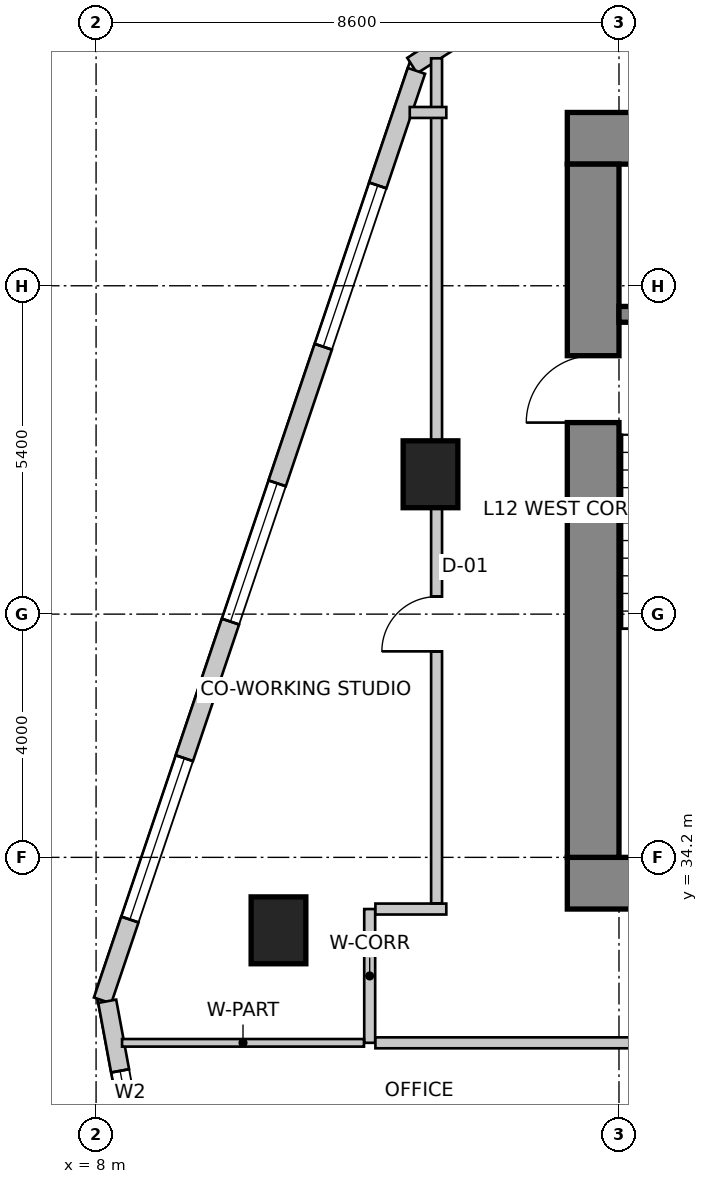
"""IFC4 building model, lengths in metres.
Left out: names, types, materials, properties, quantities, classifications, styles, units other than length and angle.
Written with IfcOpenShell. Run it as: python <this file> out.ifc"""

import sys

from ifc_helpers import new_model, si_unit, direction, frame, frame_2d, origin, origin_2d, place, context, subcontext, project, spatial, rectangle, extrude, source, transform, mapped, element, fill, save


model = new_model("IFC4")
c1 = context("Model", 3, precision=1e-05, world=origin(), true_north=direction((0.0, 1.0)))
c2 = subcontext(c1, "Body", "Model", "MODEL_VIEW")
j1 = project(units=[si_unit("LENGTHUNIT", "METRE"), si_unit("PLANEANGLEUNIT", "RADIAN")], contexts=[c1])
p1 = place(None, origin())
s1 = spatial("IfcSite", under=j1, at=p1, CompositionType="ELEMENT")
p2 = place(p1, origin())
s2 = spatial("IfcBuilding", under=s1, at=p2, CompositionType="ELEMENT")
p3 = place(p2, frame((0.0, 0.0, 51.0)))
s3 = spatial("IfcBuildingStorey", under=s2, at=p3, CompositionType="ELEMENT", Elevation=51.0)
p4 = place(p3, frame((15.75, 46.025, 0.0), z_axis=(0.0, 0.0, 1.0), x_axis=(1.0, 0.0, 0.0)))
e1 = element("IfcWall", 1, at=p4, inside=s3, PredefinedType="SHEAR", context=c2, shape_type="SweptSolid", body=[
    extrude(rectangle(XDim=16.1, YDim=0.85, at=frame_2d((8.05, 0.0))), origin(), (0.0, 0.0, 1.0), 4.0),
])
p5 = place(p3, frame((15.75, 33.775, 0.0), z_axis=(0.0, 0.0, 1.0), x_axis=(1.0, 0.0, 0.0)))
e2 = element("IfcWall", 2, at=p5, inside=s3, PredefinedType="SHEAR", context=c2, shape_type="SweptSolid", body=[
    extrude(rectangle(XDim=16.1, YDim=0.85, at=frame_2d((8.05, 0.0))), origin(), (0.0, 0.0, 1.0), 4.0),
])
m1 = source(origin(), c2, "Body", "SweptSolid", [
    extrude(rectangle(XDim=1.3, YDim=2.15, at=frame_2d((0.65, 1.075))), frame((0.0, 0.435, 0.0), z_axis=(0.0, -1.0, 0.0), x_axis=(1.0, 0.0, 0.0)), (0.0, 0.0, 1.0), 0.87),
])
p6 = place(p5, frame((10.18, 0.0, 0.0)))
e3 = element("IfcOpeningElement", 3, at=p6, cuts=e2, PredefinedType="OPENING", context=c2, shape_type="MappedRepresentation", body=[
    mapped(m1, transform((0.0, 0.0, 0.0), scale=1.0)),
])
p7 = place(p3, frame((16.175, 34.2, 0.0), z_axis=(0.0, 0.0, 1.0), x_axis=(0.0, 1.0, 0.0)))
e4 = element("IfcWall", 4, at=p7, inside=s3, PredefinedType="SHEAR", context=c2, shape_type="SweptSolid", body=[
    extrude(rectangle(XDim=11.4, YDim=0.85, at=frame_2d((5.7, 0.0))), origin(), (0.0, 0.0, 1.0), 4.0),
])
m2 = source(origin(), c2, "Body", "SweptSolid", [
    extrude(rectangle(XDim=1.1, YDim=2.15, at=frame_2d((0.55, 1.075))), frame((0.0, 0.435, 0.0), z_axis=(0.0, -1.0, 0.0), x_axis=(1.0, 0.0, 0.0)), (0.0, 0.0, 1.0), 0.87),
])
p8 = place(p7, frame((7.15, 0.0, 0.0)))
e5 = element("IfcOpeningElement", 5, at=p8, cuts=e4, PredefinedType="OPENING", context=c2, shape_type="MappedRepresentation", body=[
    mapped(m2, transform((0.0, 0.0, 0.0), scale=1.0)),
])
p9 = place(p3, frame((16.6, 43.13, 0.0), z_axis=(0.0, 0.0, 1.0), x_axis=(1.0, 0.0, 0.0)))
e6 = element("IfcWall", 6, at=p9, inside=s3, PredefinedType="SHEAR", context=c2, shape_type="SweptSolid", body=[
    extrude(rectangle(XDim=3.5, YDim=0.26, at=frame_2d((1.75, 0.0))), origin(), (0.0, 0.0, 1.0), 4.0),
])
m3 = source(origin(), c2, "Body", "SweptSolid", [
    extrude(rectangle(XDim=0.9, YDim=1.1, at=origin_2d()), origin(), (0.0, 0.0, 1.0), 4.0),
])
for number, where, z_axis, x_axis in (
    (7, (11.0, 33.0, 0.0), (0.0, 0.0, 1.0), (1.0, 0.0, 0.0)),
    (8, (13.5, 40.5, 0.0), (0.0, 0.0, 1.0), (1.0, 0.0, 0.0)),
):
    element("IfcColumn", number, at=place(p3, frame(where, z_axis=z_axis, x_axis=x_axis)), inside=s3, PredefinedType="COLUMN", context=c2, shape_type="MappedRepresentation", body=[
        mapped(m3, transform((0.0, 0.0, 0.0), scale=1.0)),
    ])
p10 = place(p3, frame((21.875, 52.743, 0.0), z_axis=(0.0, 0.0, 1.0), x_axis=(-0.843647802826, -0.536896996441, 0.0)))
e9 = element("IfcWall", 9, at=p10, inside=s3, PredefinedType="SOLIDWALL", context=c2, shape_type="SweptSolid", body=[
    extrude(rectangle(XDim=10.284, YDim=0.3, at=frame_2d((5.142, 0.0))), origin(), (0.0, 0.0, 1.0), 3.75),
])
m4 = source(origin(), c2, "Body", "SweptSolid", [
    extrude(rectangle(XDim=0.9, YDim=1.6, at=frame_2d((0.45, 0.8))), frame((0.0, 0.16, 0.0), z_axis=(0.0, -1.0, 0.0), x_axis=(1.0, 0.0, 0.0)), (0.0, 0.0, 1.0), 0.32),
])
p11 = place(p10, frame((0.629, 0.0, 0.85)))
e10 = element("IfcOpeningElement", 10, at=p11, cuts=e9, PredefinedType="OPENING", context=c2, shape_type="MappedRepresentation", body=[
    mapped(m4, transform((0.0, 0.0, 0.0), scale=1.0)),
])
m5 = source(origin(), c2, "Body", "SweptSolid", [
    extrude(rectangle(XDim=2.4, YDim=2.2, at=frame_2d((1.2, 1.1))), frame((0.0, 0.16, 0.0), z_axis=(0.0, -1.0, 0.0), x_axis=(1.0, 0.0, 0.0)), (0.0, 0.0, 1.0), 0.32),
])
p12 = place(p10, frame((3.542, 0.0, 0.85)))
e11 = element("IfcOpeningElement", 11, at=p12, cuts=e9, PredefinedType="OPENING", context=c2, shape_type="MappedRepresentation", body=[
    mapped(m5, transform((0.0, 0.0, 0.0), scale=1.0)),
])
m6 = source(origin(), c2, "Body", "SweptSolid", [
    extrude(rectangle(XDim=1.5, YDim=1.8, at=frame_2d((0.75, 0.9))), frame((0.0, 0.16, 0.0), z_axis=(0.0, -1.0, 0.0), x_axis=(1.0, 0.0, 0.0)), (0.0, 0.0, 1.0), 0.32),
])
p13 = place(p10, frame((7.904, 0.0, 0.85)))
e12 = element("IfcOpeningElement", 12, at=p13, cuts=e9, PredefinedType="OPENING", context=c2, shape_type="MappedRepresentation", body=[
    mapped(m6, transform((0.0, 0.0, 0.0), scale=1.0)),
])
p14 = place(p3, frame((13.269, 47.134, 0.0), z_axis=(0.0, 0.0, 1.0), x_axis=(-0.319920423265, -0.947444416722, 0.0)))
e13 = element("IfcWall", 13, at=p14, inside=s3, PredefinedType="SOLIDWALL", context=c2, shape_type="SweptSolid", body=[
    extrude(rectangle(XDim=16.135, YDim=0.3, at=frame_2d((8.067, 0.0))), origin(), (0.0, 0.0, 1.0), 3.75),
])
m7 = source(origin(), c2, "Body", "SweptSolid", [
    extrude(rectangle(XDim=2.8, YDim=2.4, at=frame_2d((1.4, 1.2))), frame((0.0, 0.16, 0.0), z_axis=(0.0, -1.0, 0.0), x_axis=(1.0, 0.0, 0.0)), (0.0, 0.0, 1.0), 0.32),
])
p15 = place(p14, frame((1.988, 0.0, 0.85)))
e14 = element("IfcOpeningElement", 14, at=p15, cuts=e13, PredefinedType="OPENING", context=c2, shape_type="MappedRepresentation", body=[
    mapped(m7, transform((0.0, 0.0, 0.0), scale=1.0)),
])
p16 = place(p14, frame((7.159, 0.0, 0.85)))
e15 = element("IfcOpeningElement", 15, at=p16, cuts=e13, PredefinedType="OPENING", context=c2, shape_type="MappedRepresentation", body=[
    mapped(m5, transform((0.0, 0.0, 0.0), scale=1.0)),
])
p17 = place(p14, frame((11.93, 0.0, 0.85)))
e16 = element("IfcOpeningElement", 16, at=p17, cuts=e13, PredefinedType="OPENING", context=c2, shape_type="MappedRepresentation", body=[
    mapped(m7, transform((0.0, 0.0, 0.0), scale=1.0)),
])
p18 = place(p3, frame((8.183, 31.833, 0.0), z_axis=(0.0, 0.0, 1.0), x_axis=(0.18216364648, -0.983268226834, 0.0)))
e17 = element("IfcWall", 17, at=p18, inside=s3, PredefinedType="SOLIDWALL", context=c2, shape_type="SweptSolid", body=[
    extrude(rectangle(XDim=26.678, YDim=0.3, at=frame_2d((13.339, 0.0))), origin(), (0.0, 0.0, 1.0), 3.75),
])
m8 = source(origin(), c2, "Body", "SweptSolid", [
    extrude(rectangle(XDim=1.8, YDim=2.1, at=frame_2d((0.9, 1.05))), frame((0.0, 0.16, 0.0), z_axis=(0.0, -1.0, 0.0), x_axis=(1.0, 0.0, 0.0)), (0.0, 0.0, 1.0), 0.32),
])
p19 = place(p18, frame((1.164, 0.0, 0.85)))
e18 = element("IfcOpeningElement", 18, at=p19, cuts=e17, PredefinedType="OPENING", context=c2, shape_type="MappedRepresentation", body=[
    mapped(m8, transform((0.0, 0.0, 0.0), scale=1.0)),
])
p20 = place(p18, frame((4.5, 0.0, 0.85)))
e19 = element("IfcOpeningElement", 19, at=p20, cuts=e17, PredefinedType="OPENING", context=c2, shape_type="MappedRepresentation", body=[
    mapped(m5, transform((0.0, 0.0, 0.0), scale=1.0)),
])
p21 = place(p18, frame((9.076, 0.0, 0.85)))
e20 = element("IfcOpeningElement", 20, at=p21, cuts=e17, PredefinedType="OPENING", context=c2, shape_type="MappedRepresentation", body=[
    mapped(m5, transform((0.0, 0.0, 0.0), scale=1.0)),
])
p22 = place(p18, frame((13.653, 0.0, 0.85)))
e21 = element("IfcOpeningElement", 21, at=p22, cuts=e17, PredefinedType="OPENING", context=c2, shape_type="MappedRepresentation", body=[
    mapped(m5, transform((0.0, 0.0, 0.0), scale=1.0)),
])
p23 = place(p18, frame((18.411, 0.0, 0.85)))
e22 = element("IfcOpeningElement", 22, at=p23, cuts=e17, PredefinedType="OPENING", context=c2, shape_type="MappedRepresentation", body=[
    mapped(m5, transform((0.0, 0.0, 0.0), scale=1.0)),
])
p24 = place(p18, frame((22.709, 0.0, 0.85)))
e23 = element("IfcOpeningElement", 23, at=p24, cuts=e17, PredefinedType="OPENING", context=c2, shape_type="MappedRepresentation", body=[
    mapped(m7, transform((0.0, 0.0, 0.0), scale=1.0)),
])
p25 = place(p3, frame((12.5, 31.15, 0.0), z_axis=(0.0, 0.0, 1.0), x_axis=(0.0, 1.0, 0.0)))
e24 = element("IfcWall", 24, at=p25, inside=s3, PredefinedType="PARTITIONING", context=c2, shape_type="SweptSolid", body=[
    extrude(rectangle(XDim=2.2, YDim=0.18, at=frame_2d((1.1, 0.0))), origin(), (0.0, 0.0, 1.0), 3.335),
])
p26 = place(p3, frame((12.594, 33.35, 0.0), z_axis=(0.0, 0.0, 1.0), x_axis=(1.0, 0.0, 0.0)))
e25 = element("IfcWall", 25, at=p26, inside=s3, PredefinedType="PARTITIONING", context=c2, shape_type="SweptSolid", body=[
    extrude(rectangle(XDim=1.166, YDim=0.18, at=frame_2d((0.583, 0.0))), origin(), (0.0, 0.0, 1.0), 3.75),
])
p27 = place(p3, frame((17.96, 31.15, 0.0), z_axis=(0.0, 0.0, 1.0), x_axis=(-1.0, 0.0, 0.0)))
e26 = element("IfcWall", 26, at=p27, inside=s3, PredefinedType="PARTITIONING", context=c2, shape_type="SweptSolid", body=[
    extrude(rectangle(XDim=5.366, YDim=0.18, at=frame_2d((2.683, 0.0))), origin(), (0.0, 0.0, 1.0), 3.335),
])
p28 = place(p3, frame((13.6, 33.444, 0.0), z_axis=(0.0, 0.0, 1.0), x_axis=(0.0, 1.0, 0.0)))
e27 = element("IfcWall", 27, at=p28, inside=s3, PredefinedType="PARTITIONING", context=c2, shape_type="SweptSolid", body=[
    extrude(rectangle(XDim=13.896, YDim=0.18, at=frame_2d((6.948, 0.0))), origin(), (0.0, 0.0, 1.0), 2.892),
])
m9 = source(origin(), c2, "Body", "SweptSolid", [
    extrude(rectangle(XDim=0.9, YDim=2.15, at=frame_2d((0.45, 1.075))), frame((0.0, 0.1, 0.0), z_axis=(0.0, -1.0, 0.0), x_axis=(1.0, 0.0, 0.0)), (0.0, 0.0, 1.0), 0.2),
])
p29 = place(p28, frame((4.144, 0.0, 0.0)))
e28 = element("IfcOpeningElement", 28, at=p29, cuts=e27, PredefinedType="OPENING", context=c2, shape_type="MappedRepresentation", body=[
    mapped(m9, transform((0.0, 0.0, 0.0), scale=1.0)),
])
p30 = place(p3, frame((13.76, 46.45, 0.0), z_axis=(0.0, 0.0, 1.0), x_axis=(-1.0, 0.0, 0.0)))
e29 = element("IfcWall", 29, at=p30, inside=s3, PredefinedType="PARTITIONING", context=c2, shape_type="SweptSolid", body=[
    extrude(rectangle(XDim=0.601, YDim=0.18, at=frame_2d((0.301, 0.0))), origin(), (0.0, 0.0, 1.0), 3.75),
])
p31 = place(p3, frame((12.406, 31.15, 0.0), z_axis=(0.0, 0.0, 1.0), x_axis=(-1.0, 0.0, 0.0)))
e30 = element("IfcWall", 30, at=p31, inside=s3, PredefinedType="PARTITIONING", context=c2, shape_type="SweptSolid", body=[
    extrude(rectangle(XDim=3.979, YDim=0.125, at=frame_2d((1.99, 0.0))), origin(), (0.0, 0.0, 1.0), 2.892),
])
m10 = source(origin(), c2, "Body", "SweptSolid", [
    extrude(rectangle(XDim=2.8, YDim=2.4, at=frame_2d((1.4, 1.2))), frame((0.0, -0.015, 0.0), z_axis=(0.0, -1.0, 0.0), x_axis=(1.0, 0.0, 0.0)), (0.0, 0.0, 1.0), 0.06),
])
p32 = place(p15, origin())
e31 = element("IfcWindow", 31, at=p32, inside=s3, PartitioningType="SINGLE_PANEL", PredefinedType="WINDOW", context=c2, shape_type="MappedRepresentation", body=[
    mapped(m10, transform((0.0, 0.0, 0.0), scale=1.0)),
])
fill(e14, e31)
m11 = source(origin(), c2, "Body", "SweptSolid", [
    extrude(rectangle(XDim=2.4, YDim=2.2, at=frame_2d((1.2, 1.1))), frame((0.0, -0.015, 0.0), z_axis=(0.0, -1.0, 0.0), x_axis=(1.0, 0.0, 0.0)), (0.0, 0.0, 1.0), 0.06),
])
p33 = place(p16, origin())
e32 = element("IfcWindow", 32, at=p33, inside=s3, PartitioningType="SINGLE_PANEL", PredefinedType="WINDOW", context=c2, shape_type="MappedRepresentation", body=[
    mapped(m11, transform((0.0, 0.0, 0.0), scale=1.0)),
])
fill(e15, e32)
p34 = place(p17, origin())
e33 = element("IfcWindow", 33, at=p34, inside=s3, PartitioningType="SINGLE_PANEL", PredefinedType="WINDOW", context=c2, shape_type="MappedRepresentation", body=[
    mapped(m10, transform((0.0, 0.0, 0.0), scale=1.0)),
])
fill(e16, e33)
m12 = source(origin(), c2, "Body", "SweptSolid", [
    extrude(rectangle(XDim=1.8, YDim=2.1, at=frame_2d((0.9, 1.05))), frame((0.0, -0.015, 0.0), z_axis=(0.0, -1.0, 0.0), x_axis=(1.0, 0.0, 0.0)), (0.0, 0.0, 1.0), 0.06),
])
p35 = place(p19, origin())
e34 = element("IfcWindow", 34, at=p35, inside=s3, PartitioningType="SINGLE_PANEL", PredefinedType="WINDOW", context=c2, shape_type="MappedRepresentation", body=[
    mapped(m12, transform((0.0, 0.0, 0.0), scale=1.0)),
])
fill(e18, e34)
m13 = source(origin(), c2, "Body", "SweptSolid", [
    extrude(rectangle(XDim=1.1, YDim=2.15, at=frame_2d((0.55, 1.075))), frame((0.0, 0.025, 0.0), z_axis=(0.0, -1.0, 0.0), x_axis=(1.0, 0.0, 0.0)), (0.0, 0.0, 1.0), 0.05),
])
p36 = place(p8, origin())
e35 = element("IfcDoor", 35, at=p36, inside=s3, OperationType="SINGLE_SWING_LEFT", PredefinedType="DOOR", context=c2, shape_type="MappedRepresentation", body=[
    mapped(m13, transform((0.0, 0.0, 0.0), scale=1.0)),
])
fill(e5, e35)
m14 = source(origin(), c2, "Body", "SweptSolid", [
    extrude(rectangle(XDim=0.9, YDim=2.15, at=frame_2d((0.45, 1.075))), frame((0.0, 0.025, 0.0), z_axis=(0.0, -1.0, 0.0), x_axis=(1.0, 0.0, 0.0)), (0.0, 0.0, 1.0), 0.05),
])
p37 = place(p29, origin())
e36 = element("IfcDoor", 36, at=p37, inside=s3, OperationType="SINGLE_SWING_LEFT", PredefinedType="DOOR", context=c2, shape_type="MappedRepresentation", body=[
    mapped(m14, transform((0.0, 0.0, 0.0), scale=1.0)),
])
fill(e28, e36)
save(model, sys.argv[1])
